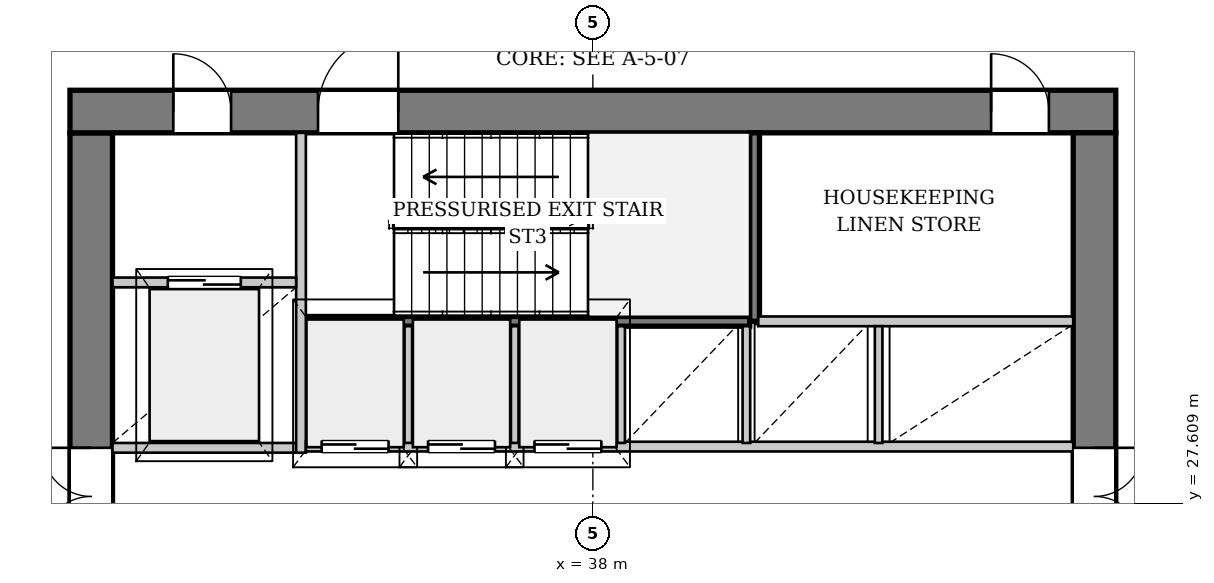
"""IFC4 building model, lengths in metres.
Left out: names, types, materials, properties, quantities, classifications, styles, units other than length and angle.
Written with IfcOpenShell. Run it as: python <this file> out.ifc"""

import sys

from ifc_helpers import new_model, si_unit, direction, frame, frame_2d, origin, place, context, subcontext, project, spatial, rectangle, extrude, source, transform, mapped, element, fill, save


model = new_model("IFC4")
c1 = context("Model", 3, precision=1e-05, world=origin(), true_north=direction((0.0, 1.0)))
c2 = subcontext(c1, "Body", "Model", "MODEL_VIEW")
j1 = project(units=[si_unit("LENGTHUNIT", "METRE"), si_unit("PLANEANGLEUNIT", "RADIAN")], contexts=[c1])
p1 = place(None, origin())
s1 = spatial("IfcSite", under=j1, at=p1, CompositionType="ELEMENT")
p2 = place(p1, origin())
s2 = spatial("IfcBuilding", under=s1, at=p2, CompositionType="ELEMENT")
p3 = place(p2, frame((0.0, 0.0, 138.1)))
s3 = spatial("IfcBuildingStorey", under=s2, at=p3, CompositionType="ELEMENT", Elevation=138.1)
p4 = place(p3, frame((29.75, 19.5, 0.0), z_axis=(0.0, 0.0, 1.0), x_axis=(0.0, 1.0, 0.0)))
e1 = element("IfcWall", 1, at=p4, inside=s3, PredefinedType="SHEAR", context=c2, shape_type="SweptSolid", body=[
    extrude(rectangle(XDim=14.2, YDim=0.7, at=frame_2d((7.1, 0.0))), origin(), (0.0, 0.0, 1.0), 3.58),
])
p5 = place(p4, frame((7.42, 0.0, 0.0)))
e2 = element("IfcOpeningElement", 2, at=p5, cuts=e1, PredefinedType="OPENING", context=c2, shape_type="SweptSolid", body=[
    extrude(rectangle(XDim=1.6, YDim=2.2, at=frame_2d((0.8, 1.1))), frame((0.0, 0.36, 0.0), z_axis=(0.0, -1.0, 0.0), x_axis=(1.0, 0.0, 0.0)), (0.0, 0.0, 1.0), 0.72),
])
p6 = place(p3, frame((29.4, 34.05, 0.0), z_axis=(0.0, 0.0, 1.0), x_axis=(1.0, 0.0, 0.0)))
e3 = element("IfcWall", 3, at=p6, inside=s3, PredefinedType="SHEAR", context=c2, shape_type="SweptSolid", body=[
    extrude(rectangle(XDim=17.2, YDim=0.7, at=frame_2d((8.6, 0.0))), origin(), (0.0, 0.0, 1.0), 3.58),
])
p7 = place(p6, frame((1.7, 0.0, 0.0)))
e4 = element("IfcOpeningElement", 4, at=p7, cuts=e3, PredefinedType="OPENING", context=c2, shape_type="SweptSolid", body=[
    extrude(rectangle(XDim=0.95, YDim=2.1, at=frame_2d((0.475, 1.05))), frame((0.0, 0.36, 0.0), z_axis=(0.0, -1.0, 0.0), x_axis=(1.0, 0.0, 0.0)), (0.0, 0.0, 1.0), 0.72),
])
p8 = place(p6, frame((4.08, 0.0, 0.0)))
e5 = element("IfcOpeningElement", 5, at=p8, cuts=e3, PredefinedType="OPENING", context=c2, shape_type="SweptSolid", body=[
    extrude(rectangle(XDim=1.32, YDim=2.2, at=frame_2d((0.66, 1.1))), frame((0.0, 0.36, 0.0), z_axis=(0.0, -1.0, 0.0), x_axis=(1.0, 0.0, 0.0)), (0.0, 0.0, 1.0), 0.72),
])
p9 = place(p6, frame((15.15, 0.0, 0.0)))
e6 = element("IfcOpeningElement", 6, at=p9, cuts=e3, PredefinedType="OPENING", context=c2, shape_type="SweptSolid", body=[
    extrude(rectangle(XDim=0.95, YDim=2.1, at=frame_2d((0.475, 1.05))), frame((0.0, 0.36, 0.0), z_axis=(0.0, -1.0, 0.0), x_axis=(1.0, 0.0, 0.0)), (0.0, 0.0, 1.0), 0.72),
])
p10 = place(p3, frame((46.25, 33.7, 0.0), z_axis=(0.0, 0.0, 1.0), x_axis=(0.0, -1.0, 0.0)))
e7 = element("IfcWall", 7, at=p10, inside=s3, PredefinedType="SHEAR", context=c2, shape_type="SweptSolid", body=[
    extrude(rectangle(XDim=14.2, YDim=0.7, at=frame_2d((7.1, 0.0))), origin(), (0.0, 0.0, 1.0), 3.58),
])
p11 = place(p10, frame((5.18, 0.0, 0.0)))
e8 = element("IfcOpeningElement", 8, at=p11, cuts=e7, PredefinedType="OPENING", context=c2, shape_type="SweptSolid", body=[
    extrude(rectangle(XDim=1.6, YDim=2.2, at=frame_2d((0.8, 1.1))), frame((0.0, 0.36, 0.0), z_axis=(0.0, -1.0, 0.0), x_axis=(1.0, 0.0, 0.0)), (0.0, 0.0, 1.0), 0.72),
])
p12 = place(p3, frame((33.28, 30.6, 0.0), z_axis=(0.0, 0.0, 1.0), x_axis=(1.0, 0.0, 0.0)))
e9 = element("IfcWall", 9, at=p12, inside=s3, PredefinedType="PARTITIONING", context=c2, shape_type="SweptSolid", body=[
    extrude(rectangle(XDim=7.3, YDim=0.16, at=frame_2d((3.65, 0.0))), origin(), (0.0, 0.0, 1.0), 3.58),
])
p13 = place(p3, frame((40.66, 30.6, 0.0), z_axis=(0.0, 0.0, 1.0), x_axis=(0.0, 1.0, 0.0)))
e10 = element("IfcWall", 10, at=p13, inside=s3, PredefinedType="PARTITIONING", context=c2, shape_type="SweptSolid", body=[
    extrude(rectangle(XDim=3.1, YDim=0.16, at=frame_2d((1.55, 0.0))), origin(), (0.0, 0.0, 1.0), 3.58),
])
p14 = place(p3, frame((30.1, 28.52, 0.0), z_axis=(0.0, 0.0, 1.0), x_axis=(1.0, 0.0, 0.0)))
e11 = element("IfcWall", 11, at=p14, inside=s3, PredefinedType="PARTITIONING", context=c2, shape_type="SweptSolid", body=[
    extrude(rectangle(XDim=3.02, YDim=0.16, at=frame_2d((1.51, 0.0))), origin(), (0.0, 0.0, 1.0), 3.58),
])
p15 = place(p3, frame((33.2, 28.44, 0.0), z_axis=(0.0, 0.0, 1.0), x_axis=(0.0, 1.0, 0.0)))
e12 = element("IfcWall", 12, at=p15, inside=s3, PredefinedType="PARTITIONING", context=c2, shape_type="SweptSolid", body=[
    extrude(rectangle(XDim=5.26, YDim=0.16, at=frame_2d((2.63, 0.0))), origin(), (0.0, 0.0, 1.0), 3.58),
])
p16 = place(p3, frame((30.1, 31.24, 0.0), z_axis=(0.0, 0.0, 1.0), x_axis=(1.0, 0.0, 0.0)))
e13 = element("IfcWall", 13, at=p16, inside=s3, PredefinedType="PARTITIONING", context=c2, shape_type="SweptSolid", body=[
    extrude(rectangle(XDim=3.02, YDim=0.16, at=frame_2d((1.51, 0.0))), origin(), (0.0, 0.0, 1.0), 3.58),
])
p17 = place(p16, frame((0.91, 0.0, 0.0)))
e14 = element("IfcOpeningElement", 14, at=p17, cuts=e13, PredefinedType="OPENING", context=c2, shape_type="SweptSolid", body=[
    extrude(rectangle(XDim=1.2, YDim=2.2, at=frame_2d((0.6, 1.1))), frame((0.0, 0.09, 0.0), z_axis=(0.0, -1.0, 0.0), x_axis=(1.0, 0.0, 0.0)), (0.0, 0.0, 1.0), 0.18),
])
p18 = place(p3, frame((33.28, 28.54, 0.0), z_axis=(0.0, 0.0, 1.0), x_axis=(1.0, 0.0, 0.0)))
e15 = element("IfcWall", 15, at=p18, inside=s3, PredefinedType="PARTITIONING", context=c2, shape_type="SweptSolid", body=[
    extrude(rectangle(XDim=12.62, YDim=0.16, at=frame_2d((6.31, 0.0))), origin(), (0.0, 0.0, 1.0), 3.58),
])
p19 = place(p18, frame((0.26, 0.0, 0.0)))
e16 = element("IfcOpeningElement", 16, at=p19, cuts=e15, PredefinedType="OPENING", context=c2, shape_type="SweptSolid", body=[
    extrude(rectangle(XDim=1.1, YDim=2.2, at=frame_2d((0.55, 1.1))), frame((0.0, 0.09, 0.0), z_axis=(0.0, -1.0, 0.0), x_axis=(1.0, 0.0, 0.0)), (0.0, 0.0, 1.0), 0.18),
])
p20 = place(p18, frame((2.01, 0.0, 0.0)))
e17 = element("IfcOpeningElement", 17, at=p20, cuts=e15, PredefinedType="OPENING", context=c2, shape_type="SweptSolid", body=[
    extrude(rectangle(XDim=1.1, YDim=2.2, at=frame_2d((0.55, 1.1))), frame((0.0, 0.09, 0.0), z_axis=(0.0, -1.0, 0.0), x_axis=(1.0, 0.0, 0.0)), (0.0, 0.0, 1.0), 0.18),
])
p21 = place(p18, frame((3.76, 0.0, 0.0)))
e18 = element("IfcOpeningElement", 18, at=p21, cuts=e15, PredefinedType="OPENING", context=c2, shape_type="SweptSolid", body=[
    extrude(rectangle(XDim=1.1, YDim=2.2, at=frame_2d((0.55, 1.1))), frame((0.0, 0.09, 0.0), z_axis=(0.0, -1.0, 0.0), x_axis=(1.0, 0.0, 0.0)), (0.0, 0.0, 1.0), 0.18),
])
p22 = place(p3, frame((40.72, 30.6, 0.0), z_axis=(0.0, 0.0, 1.0), x_axis=(1.0, 0.0, 0.0)))
e19 = element("IfcWall", 19, at=p22, inside=s3, PredefinedType="PARTITIONING", context=c2, shape_type="SweptSolid", body=[
    extrude(rectangle(XDim=5.18, YDim=0.16, at=frame_2d((2.59, 0.0))), origin(), (0.0, 0.0, 1.0), 3.58),
])
for number, where, z_axis, x_axis in (
    (20, (34.965, 28.6, 0.0), (0.0, 0.0, 1.0), (0.0, 1.0, 0.0)),
    (21, (36.715, 28.6, 0.0), (0.0, 0.0, 1.0), (0.0, 1.0, 0.0)),
    (22, (38.465, 28.6, 0.0), (0.0, 0.0, 1.0), (0.0, 1.0, 0.0)),
    (23, (40.525, 28.6, 0.0), (0.0, 0.0, 1.0), (0.0, 1.0, 0.0)),
    (24, (42.7, 28.6, 0.0), (0.0, 0.0, 1.0), (0.0, 1.0, 0.0)),
):
    element("IfcWall", number, at=place(p3, frame(where, z_axis=z_axis, x_axis=x_axis)), inside=s3, PredefinedType="PARTITIONING", context=c2, shape_type="SweptSolid", body=[
        extrude(rectangle(XDim=1.92, YDim=0.125, at=frame_2d((0.96, 0.0))), origin(), (0.0, 0.0, 1.0), 3.58),
    ])
m1 = source(origin(), c2, "Body", "SweptSolid", [
    extrude(rectangle(XDim=1.6, YDim=2.2, at=frame_2d((0.8, 1.1))), frame((0.0, 0.025, 0.0), z_axis=(0.0, -1.0, 0.0), x_axis=(1.0, 0.0, 0.0)), (0.0, 0.0, 1.0), 0.05),
])
p23 = place(p5, origin())
e25 = element("IfcDoor", 25, at=p23, inside=s3, OperationType="DOUBLE_DOOR_SINGLE_SWING", PredefinedType="DOOR", context=c2, shape_type="MappedRepresentation", body=[
    mapped(m1, transform((0.0, 0.0, 0.0), x_axis=(1.0, 0.0, 0.0), y_axis=(0.0, 1.0, 0.0), z_axis=(0.0, 0.0, 1.0), scale=1.0)),
])
fill(e2, e25)
m2 = source(origin(), c2, "Body", "SweptSolid", [
    extrude(rectangle(XDim=0.95, YDim=2.1, at=frame_2d((0.475, 1.05))), frame((0.0, 0.025, 0.0), z_axis=(0.0, -1.0, 0.0), x_axis=(1.0, 0.0, 0.0)), (0.0, 0.0, 1.0), 0.05),
])
p24 = place(p7, origin())
e26 = element("IfcDoor", 26, at=p24, inside=s3, OperationType="SINGLE_SWING_LEFT", PredefinedType="DOOR", context=c2, shape_type="MappedRepresentation", body=[
    mapped(m2, transform((0.0, 0.0, 0.0), x_axis=(1.0, 0.0, 0.0), y_axis=(0.0, 1.0, 0.0), z_axis=(0.0, 0.0, 1.0), scale=1.0)),
])
fill(e4, e26)
m3 = source(origin(), c2, "Body", "SweptSolid", [
    extrude(rectangle(XDim=1.32, YDim=2.2, at=frame_2d((0.66, 1.1))), frame((0.0, 0.025, 0.0), z_axis=(0.0, -1.0, 0.0), x_axis=(1.0, 0.0, 0.0)), (0.0, 0.0, 1.0), 0.05),
])
p25 = place(p8, origin())
e27 = element("IfcDoor", 27, at=p25, inside=s3, OperationType="SINGLE_SWING_RIGHT", PredefinedType="DOOR", context=c2, shape_type="MappedRepresentation", body=[
    mapped(m3, transform((0.0, 0.0, 0.0), x_axis=(1.0, 0.0, 0.0), y_axis=(0.0, 1.0, 0.0), z_axis=(0.0, 0.0, 1.0), scale=1.0)),
])
fill(e5, e27)
p26 = place(p11, origin())
e28 = element("IfcDoor", 28, at=p26, inside=s3, OperationType="DOUBLE_DOOR_SINGLE_SWING", PredefinedType="DOOR", context=c2, shape_type="MappedRepresentation", body=[
    mapped(m1, transform((0.0, 0.0, 0.0), x_axis=(1.0, 0.0, 0.0), y_axis=(0.0, 1.0, 0.0), z_axis=(0.0, 0.0, 1.0), scale=1.0)),
])
fill(e8, e28)
m4 = source(origin(), c2, "Body", "SweptSolid", [
    extrude(rectangle(XDim=1.2, YDim=2.2, at=frame_2d((0.6, 1.1))), frame((0.0, 0.025, 0.0), z_axis=(0.0, -1.0, 0.0), x_axis=(1.0, 0.0, 0.0)), (0.0, 0.0, 1.0), 0.05),
])
p27 = place(p17, origin())
e29 = element("IfcDoor", 29, at=p27, inside=s3, OperationType="DOUBLE_DOOR_SLIDING", PredefinedType="DOOR", context=c2, shape_type="MappedRepresentation", body=[
    mapped(m4, transform((0.0, 0.0, 0.0), x_axis=(1.0, 0.0, 0.0), y_axis=(0.0, 1.0, 0.0), z_axis=(0.0, 0.0, 1.0), scale=1.0)),
])
fill(e14, e29)
m5 = source(origin(), c2, "Body", "SweptSolid", [
    extrude(rectangle(XDim=1.1, YDim=2.2, at=frame_2d((0.55, 1.1))), frame((0.0, 0.025, 0.0), z_axis=(0.0, -1.0, 0.0), x_axis=(1.0, 0.0, 0.0)), (0.0, 0.0, 1.0), 0.05),
])
p28 = place(p19, origin())
e30 = element("IfcDoor", 30, at=p28, inside=s3, OperationType="DOUBLE_DOOR_SLIDING", PredefinedType="DOOR", context=c2, shape_type="MappedRepresentation", body=[
    mapped(m5, transform((0.0, 0.0, 0.0), x_axis=(1.0, 0.0, 0.0), y_axis=(0.0, 1.0, 0.0), z_axis=(0.0, 0.0, 1.0), scale=1.0)),
])
fill(e16, e30)
p29 = place(p20, origin())
e31 = element("IfcDoor", 31, at=p29, inside=s3, OperationType="DOUBLE_DOOR_SLIDING", PredefinedType="DOOR", context=c2, shape_type="MappedRepresentation", body=[
    mapped(m5, transform((0.0, 0.0, 0.0), x_axis=(1.0, 0.0, 0.0), y_axis=(0.0, 1.0, 0.0), z_axis=(0.0, 0.0, 1.0), scale=1.0)),
])
fill(e17, e31)
p30 = place(p21, origin())
e32 = element("IfcDoor", 32, at=p30, inside=s3, OperationType="DOUBLE_DOOR_SLIDING", PredefinedType="DOOR", context=c2, shape_type="MappedRepresentation", body=[
    mapped(m5, transform((0.0, 0.0, 0.0), x_axis=(1.0, 0.0, 0.0), y_axis=(0.0, 1.0, 0.0), z_axis=(0.0, 0.0, 1.0), scale=1.0)),
])
fill(e18, e32)
p31 = place(p9, origin())
e33 = element("IfcDoor", 33, at=p31, inside=s3, OperationType="SINGLE_SWING_LEFT", PredefinedType="DOOR", context=c2, shape_type="MappedRepresentation", body=[
    mapped(m2, transform((0.0, 0.0, 0.0), x_axis=(1.0, 0.0, 0.0), y_axis=(0.0, 1.0, 0.0), z_axis=(0.0, 0.0, 1.0), scale=1.0)),
])
fill(e6, e33)
save(model, sys.argv[1])
